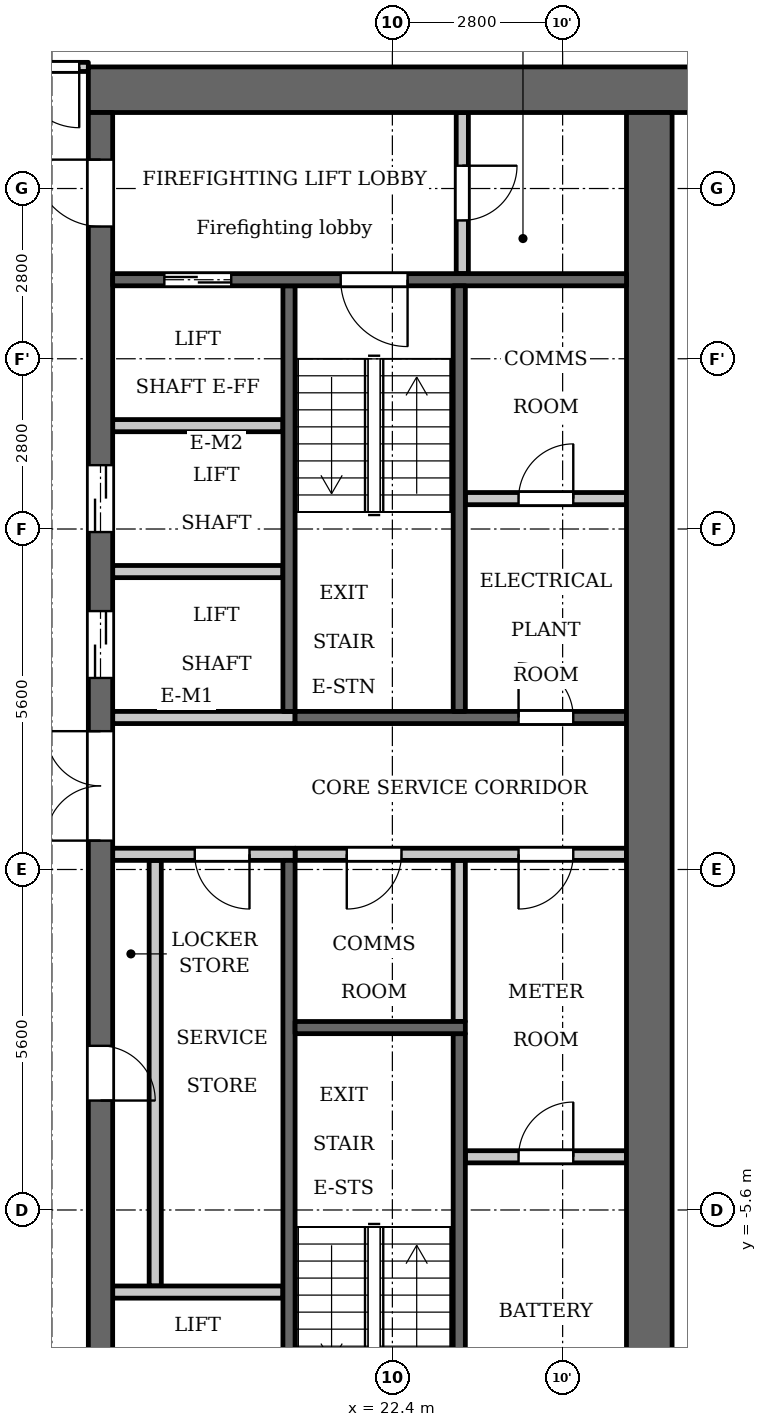
"""IFC4 building model, lengths in metres.
Left out: names, types, materials, properties, quantities, classifications, styles, units other than length and angle.
Written with IfcOpenShell. Run it as: python <this file> out.ifc"""

import sys

from ifc_helpers import new_model, si_unit, direction, frame, frame_2d, origin, place, context, subcontext, project, spatial, rectangle, extrude, element, fill, save


model = new_model("IFC4")
c1 = context("Model", 3, precision=1e-05, world=origin(), true_north=direction((0.0, 1.0)))
c2 = subcontext(c1, "Body", "Model", "MODEL_VIEW")
j1 = project(units=[si_unit("LENGTHUNIT", "METRE"), si_unit("PLANEANGLEUNIT", "RADIAN")], contexts=[c1])
p1 = place(None, origin())
s1 = spatial("IfcSite", under=j1, at=p1, CompositionType="ELEMENT")
p2 = place(p1, origin())
s2 = spatial("IfcBuilding", under=s1, at=p2, CompositionType="ELEMENT")
p3 = place(p2, frame((0.0, 0.0, 157.1)))
s3 = spatial("IfcBuildingStorey", under=s2, at=p3, CompositionType="ELEMENT", Elevation=157.1)
p4 = place(p3, frame((23.5, -2.5, 0.0), z_axis=(0.0, 0.0, 1.0), x_axis=(0.0, 1.0, 0.0)))
e1 = element("IfcWall", 1, at=p4, inside=s3, PredefinedType="PARTITIONING", context=c2, shape_type="SweptSolid", body=[
    extrude(rectangle(XDim=2.65, YDim=0.2, at=frame_2d((1.325, 0.0))), origin(), (0.0, 0.0, 1.0), 3.2),
])
p5 = place(p3, frame((20.7, 2.6, 0.0), z_axis=(0.0, 0.0, 1.0), x_axis=(0.0, 1.0, 0.0)))
e2 = element("IfcWall", 2, at=p5, inside=s3, PredefinedType="SHEAR", context=c2, shape_type="SweptSolid", body=[
    extrude(rectangle(XDim=7.0, YDim=0.2, at=frame_2d((3.5, 0.0))), origin(), (0.0, 0.0, 1.0), 3.2),
])
p6 = place(p3, frame((20.7, -9.6, 0.0), z_axis=(0.0, 0.0, 1.0), x_axis=(0.0, 1.0, 0.0)))
e3 = element("IfcWall", 3, at=p6, inside=s3, PredefinedType="SHEAR", context=c2, shape_type="SweptSolid", body=[
    extrude(rectangle(XDim=9.75, YDim=0.2, at=frame_2d((4.875, 0.0))), origin(), (0.0, 0.0, 1.0), 3.2),
])
p7 = place(p3, frame((20.8, 2.5, 0.0), z_axis=(0.0, 0.0, 1.0), x_axis=(1.0, 0.0, 0.0)))
e4 = element("IfcWall", 4, at=p7, inside=s3, PredefinedType="SHEAR", context=c2, shape_type="SweptSolid", body=[
    extrude(rectangle(XDim=5.45, YDim=0.2, at=frame_2d((2.725, 0.0))), origin(), (0.0, 0.0, 1.0), 3.2),
])
p8 = place(p7, frame((3.675, 0.0, 0.0)))
e5 = element("IfcOpeningElement", 5, at=p8, cuts=e4, PredefinedType="OPENING", context=c2, shape_type="SweptSolid", body=[
    extrude(rectangle(XDim=0.9, YDim=2.1, at=frame_2d((0.45, 1.05))), frame((0.0, 0.11, 0.0), z_axis=(0.0, -1.0, 0.0), x_axis=(1.0, 0.0, 0.0)), (0.0, 0.0, 1.0), 0.22),
])
p9 = place(p3, frame((20.8, 0.25, 0.0), z_axis=(0.0, 0.0, 1.0), x_axis=(1.0, 0.0, 0.0)))
e6 = element("IfcWall", 6, at=p9, inside=s3, PredefinedType="PARTITIONING", context=c2, shape_type="SweptSolid", body=[
    extrude(rectangle(XDim=5.45, YDim=0.2, at=frame_2d((2.725, 0.0))), origin(), (0.0, 0.0, 1.0), 3.2),
])
p10 = place(p9, frame((0.85, 0.0, 0.0)))
e7 = element("IfcOpeningElement", 7, at=p10, cuts=e6, PredefinedType="OPENING", context=c2, shape_type="SweptSolid", body=[
    extrude(rectangle(XDim=0.9, YDim=2.1, at=frame_2d((0.45, 1.05))), frame((0.0, 0.11, 0.0), z_axis=(0.0, -1.0, 0.0), x_axis=(1.0, 0.0, 0.0)), (0.0, 0.0, 1.0), 0.22),
])
p11 = place(p9, frame((3.675, 0.0, 0.0)))
e8 = element("IfcOpeningElement", 8, at=p11, cuts=e6, PredefinedType="OPENING", context=c2, shape_type="SweptSolid", body=[
    extrude(rectangle(XDim=0.9, YDim=2.1, at=frame_2d((0.45, 1.05))), frame((0.0, 0.11, 0.0), z_axis=(0.0, -1.0, 0.0), x_axis=(1.0, 0.0, 0.0)), (0.0, 0.0, 1.0), 0.22),
])
p12 = place(p3, frame((17.4, 12.825, 0.0), z_axis=(0.0, 0.0, 1.0), x_axis=(1.0, 0.0, 0.0)))
e9 = element("IfcWall", 9, at=p12, inside=s3, PredefinedType="SHEAR", context=c2, shape_type="SweptSolid", body=[
    extrude(rectangle(XDim=10.4, YDim=0.75, at=frame_2d((5.2, 0.0))), origin(), (0.0, 0.0, 1.0), 3.2),
])
p13 = place(p3, frame((18.5, -6.85, 0.0), z_axis=(0.0, 0.0, 1.0), x_axis=(0.0, 1.0, 0.0)))
e10 = element("IfcWall", 10, at=p13, inside=s3, PredefinedType="PARTITIONING", context=c2, shape_type="SweptSolid", body=[
    extrude(rectangle(XDim=7.0, YDim=0.2, at=frame_2d((3.5, 0.0))), origin(), (0.0, 0.0, 1.0), 3.2),
])
p14 = place(p3, frame((17.6, -12.45, 0.0), z_axis=(0.0, 0.0, 1.0), x_axis=(0.0, 1.0, 0.0)))
e11 = element("IfcWall", 11, at=p14, inside=s3, PredefinedType="SHEAR", context=c2, shape_type="SweptSolid", body=[
    extrude(rectangle(XDim=24.9, YDim=0.4, at=frame_2d((12.45, 0.0))), origin(), (0.0, 0.0, 1.0), 3.2),
])
p15 = place(p14, frame((8.65, 0.0, 0.0)))
e12 = element("IfcOpeningElement", 12, at=p15, cuts=e11, PredefinedType="OPENING", context=c2, shape_type="SweptSolid", body=[
    extrude(rectangle(XDim=0.9, YDim=2.1, at=frame_2d((0.45, 1.05))), frame((0.0, 0.21, 0.0), z_axis=(0.0, -1.0, 0.0), x_axis=(1.0, 0.0, 0.0)), (0.0, 0.0, 1.0), 0.42),
])
p16 = place(p14, frame((15.6, 0.0, 0.0)))
e13 = element("IfcOpeningElement", 13, at=p16, cuts=e11, PredefinedType="OPENING", context=c2, shape_type="SweptSolid", body=[
    extrude(rectangle(XDim=1.1, YDim=2.1, at=frame_2d((0.55, 1.05))), frame((0.0, 0.21, 0.0), z_axis=(0.0, -1.0, 0.0), x_axis=(1.0, 0.0, 0.0)), (0.0, 0.0, 1.0), 0.42),
])
p17 = place(p14, frame((18.0, 0.0, 0.0)))
e14 = element("IfcOpeningElement", 14, at=p17, cuts=e11, PredefinedType="OPENING", context=c2, shape_type="SweptSolid", body=[
    extrude(rectangle(XDim=1.1, YDim=2.1, at=frame_2d((0.55, 1.05))), frame((0.0, 0.21, 0.0), z_axis=(0.0, -1.0, 0.0), x_axis=(1.0, 0.0, 0.0)), (0.0, 0.0, 1.0), 0.42),
])
p18 = place(p14, frame((23.025, 0.0, 0.0)))
e15 = element("IfcOpeningElement", 15, at=p18, cuts=e11, PredefinedType="OPENING", context=c2, shape_type="SweptSolid", body=[
    extrude(rectangle(XDim=1.1, YDim=2.1, at=frame_2d((0.55, 1.05))), frame((0.0, 0.21, 0.0), z_axis=(0.0, -1.0, 0.0), x_axis=(1.0, 0.0, 0.0)), (0.0, 0.0, 1.0), 0.42),
])
p19 = place(p14, frame((0.775, 0.0, 0.0)))
e16 = element("IfcOpeningElement", 16, at=p19, cuts=e11, PredefinedType="OPENING", context=c2, shape_type="SweptSolid", body=[
    extrude(rectangle(XDim=1.1, YDim=2.1, at=frame_2d((0.55, 1.05))), frame((0.0, 0.21, 0.0), z_axis=(0.0, -1.0, 0.0), x_axis=(1.0, 0.0, 0.0)), (0.0, 0.0, 1.0), 0.42),
])
p20 = place(p14, frame((12.925, 0.0, 0.0)))
e17 = element("IfcOpeningElement", 17, at=p20, cuts=e11, PredefinedType="OPENING", context=c2, shape_type="SweptSolid", body=[
    extrude(rectangle(XDim=1.8, YDim=2.1, at=frame_2d((0.9, 1.05))), frame((0.0, 0.21, 0.0), z_axis=(0.0, -1.0, 0.0), x_axis=(1.0, 0.0, 0.0)), (0.0, 0.0, 1.0), 0.42),
])
p21 = place(p3, frame((26.625, -12.45, 0.0), z_axis=(0.0, 0.0, 1.0), x_axis=(0.0, 1.0, 0.0)))
e18 = element("IfcWall", 18, at=p21, inside=s3, PredefinedType="SHEAR", context=c2, shape_type="SweptSolid", body=[
    extrude(rectangle(XDim=24.9, YDim=0.75, at=frame_2d((12.45, 0.0))), origin(), (0.0, 0.0, 1.0), 3.2),
])
p22 = place(p3, frame((23.55, 9.8, 0.0), z_axis=(0.0, 0.0, 1.0), x_axis=(0.0, 1.0, 0.0)))
e19 = element("IfcWall", 19, at=p22, inside=s3, PredefinedType="PARTITIONING", context=c2, shape_type="SweptSolid", body=[
    extrude(rectangle(XDim=2.65, YDim=0.2, at=frame_2d((1.325, 0.0))), origin(), (0.0, 0.0, 1.0), 3.2),
])
p23 = place(p22, frame((0.875, 0.0, 0.0)))
e20 = element("IfcOpeningElement", 20, at=p23, cuts=e19, PredefinedType="OPENING", context=c2, shape_type="SweptSolid", body=[
    extrude(rectangle(XDim=0.9, YDim=2.1, at=frame_2d((0.45, 1.05))), frame((0.0, 0.11, 0.0), z_axis=(0.0, -1.0, 0.0), x_axis=(1.0, 0.0, 0.0)), (0.0, 0.0, 1.0), 0.22),
])
p24 = place(p3, frame((23.6, -4.725, 0.0), z_axis=(0.0, 0.0, 1.0), x_axis=(1.0, 0.0, 0.0)))
e21 = element("IfcWall", 21, at=p24, inside=s3, PredefinedType="PARTITIONING", context=c2, shape_type="SweptSolid", body=[
    extrude(rectangle(XDim=2.65, YDim=0.2, at=frame_2d((1.325, 0.0))), origin(), (0.0, 0.0, 1.0), 3.2),
])
p25 = place(p24, frame((0.875, 0.0, 0.0)))
e22 = element("IfcOpeningElement", 22, at=p25, cuts=e21, PredefinedType="OPENING", context=c2, shape_type="SweptSolid", body=[
    extrude(rectangle(XDim=0.9, YDim=2.1, at=frame_2d((0.45, 1.05))), frame((0.0, 0.11, 0.0), z_axis=(0.0, -1.0, 0.0), x_axis=(1.0, 0.0, 0.0)), (0.0, 0.0, 1.0), 0.22),
])
p26 = place(p3, frame((23.6, 6.1, 0.0), z_axis=(0.0, 0.0, 1.0), x_axis=(1.0, 0.0, 0.0)))
e23 = element("IfcWall", 23, at=p26, inside=s3, PredefinedType="PARTITIONING", context=c2, shape_type="SweptSolid", body=[
    extrude(rectangle(XDim=2.65, YDim=0.2, at=frame_2d((1.325, 0.0))), origin(), (0.0, 0.0, 1.0), 3.2),
])
p27 = place(p26, frame((0.875, 0.0, 0.0)))
e24 = element("IfcOpeningElement", 24, at=p27, cuts=e23, PredefinedType="OPENING", context=c2, shape_type="SweptSolid", body=[
    extrude(rectangle(XDim=0.9, YDim=2.1, at=frame_2d((0.45, 1.05))), frame((0.0, 0.11, 0.0), z_axis=(0.0, -1.0, 0.0), x_axis=(1.0, 0.0, 0.0)), (0.0, 0.0, 1.0), 0.22),
])
p28 = place(p3, frame((17.8, -6.95, 0.0), z_axis=(0.0, 0.0, 1.0), x_axis=(1.0, 0.0, 0.0)))
e25 = element("IfcWall", 25, at=p28, inside=s3, PredefinedType="PARTITIONING", context=c2, shape_type="SweptSolid", body=[
    extrude(rectangle(XDim=2.8, YDim=0.2, at=frame_2d((1.4, 0.0))), origin(), (0.0, 0.0, 1.0), 3.2),
])
p29 = place(p3, frame((17.8, 0.25, 0.0), z_axis=(0.0, 0.0, 1.0), x_axis=(1.0, 0.0, 0.0)))
e26 = element("IfcWall", 26, at=p29, inside=s3, PredefinedType="PARTITIONING", context=c2, shape_type="SweptSolid", body=[
    extrude(rectangle(XDim=3.0, YDim=0.2, at=frame_2d((1.5, 0.0))), origin(), (0.0, 0.0, 1.0), 3.2),
])
p30 = place(p29, frame((1.35, 0.0, 0.0)))
e27 = element("IfcOpeningElement", 27, at=p30, cuts=e26, PredefinedType="OPENING", context=c2, shape_type="SweptSolid", body=[
    extrude(rectangle(XDim=0.9, YDim=2.1, at=frame_2d((0.45, 1.05))), frame((0.0, 0.11, 0.0), z_axis=(0.0, -1.0, 0.0), x_axis=(1.0, 0.0, 0.0)), (0.0, 0.0, 1.0), 0.22),
])
p31 = place(p3, frame((17.8, 2.5, 0.0), z_axis=(0.0, 0.0, 1.0), x_axis=(1.0, 0.0, 0.0)))
e28 = element("IfcWall", 28, at=p31, inside=s3, PredefinedType="PARTITIONING", context=c2, shape_type="SweptSolid", body=[
    extrude(rectangle(XDim=3.0, YDim=0.2, at=frame_2d((1.5, 0.0))), origin(), (0.0, 0.0, 1.0), 3.2),
])
for number, where, z_axis, x_axis in (
    (29, (17.8, 4.9, 0.0), (0.0, 0.0, 1.0), (1.0, 0.0, 0.0)),
    (30, (17.8, 7.3, 0.0), (0.0, 0.0, 1.0), (1.0, 0.0, 0.0)),
):
    element("IfcWall", number, at=place(p3, frame(where, z_axis=z_axis, x_axis=x_axis)), inside=s3, PredefinedType="PARTITIONING", context=c2, shape_type="SweptSolid", body=[
        extrude(rectangle(XDim=2.8, YDim=0.2, at=frame_2d((1.4, 0.0))), origin(), (0.0, 0.0, 1.0), 3.2),
    ])
p32 = place(p3, frame((17.8, 9.7, 0.0), z_axis=(0.0, 0.0, 1.0), x_axis=(1.0, 0.0, 0.0)))
e31 = element("IfcWall", 31, at=p32, inside=s3, PredefinedType="SHEAR", context=c2, shape_type="SweptSolid", body=[
    extrude(rectangle(XDim=8.45, YDim=0.2, at=frame_2d((4.225, 0.0))), origin(), (0.0, 0.0, 1.0), 3.2),
])
p33 = place(p32, frame((0.85, 0.0, 0.0)))
e32 = element("IfcOpeningElement", 32, at=p33, cuts=e31, PredefinedType="OPENING", context=c2, shape_type="SweptSolid", body=[
    extrude(rectangle(XDim=1.1, YDim=2.1, at=frame_2d((0.55, 1.05))), frame((0.0, 0.11, 0.0), z_axis=(0.0, -1.0, 0.0), x_axis=(1.0, 0.0, 0.0)), (0.0, 0.0, 1.0), 0.22),
])
p34 = place(p32, frame((3.75, 0.0, 0.0)))
e33 = element("IfcOpeningElement", 33, at=p34, cuts=e31, PredefinedType="OPENING", context=c2, shape_type="SweptSolid", body=[
    extrude(rectangle(XDim=1.1, YDim=2.1, at=frame_2d((0.55, 1.05))), frame((0.0, 0.11, 0.0), z_axis=(0.0, -1.0, 0.0), x_axis=(1.0, 0.0, 0.0)), (0.0, 0.0, 1.0), 0.22),
])
p35 = place(p3, frame((23.5, 2.6, 0.0), z_axis=(0.0, 0.0, 1.0), x_axis=(0.0, 1.0, 0.0)))
e34 = element("IfcWall", 34, at=p35, inside=s3, PredefinedType="SHEAR", context=c2, shape_type="SweptSolid", body=[
    extrude(rectangle(XDim=7.0, YDim=0.2, at=frame_2d((3.5, 0.0))), origin(), (0.0, 0.0, 1.0), 3.2),
])
p36 = place(p3, frame((23.5, -9.6, 0.0), z_axis=(0.0, 0.0, 1.0), x_axis=(0.0, 1.0, 0.0)))
e35 = element("IfcWall", 35, at=p36, inside=s3, PredefinedType="SHEAR", context=c2, shape_type="SweptSolid", body=[
    extrude(rectangle(XDim=6.9, YDim=0.2, at=frame_2d((3.45, 0.0))), origin(), (0.0, 0.0, 1.0), 3.2),
])
p37 = place(p3, frame((20.8, -2.6, 0.0), z_axis=(0.0, 0.0, 1.0), x_axis=(1.0, 0.0, 0.0)))
e36 = element("IfcWall", 36, at=p37, inside=s3, PredefinedType="SHEAR", context=c2, shape_type="SweptSolid", body=[
    extrude(rectangle(XDim=2.8, YDim=0.2, at=frame_2d((1.4, 0.0))), origin(), (0.0, 0.0, 1.0), 3.2),
])
p38 = place(p3, frame((-17.4, 13.2, 0.0), z_axis=(0.0, 0.0, 1.0), x_axis=(1.0, 0.0, 0.0)))
e37 = element("IfcWall", 37, at=p38, inside=s3, PredefinedType="PARTITIONING", context=c2, shape_type="SweptSolid", body=[
    extrude(rectangle(XDim=34.8, YDim=0.15, at=frame_2d((17.4, 0.0))), origin(), (0.0, 0.0, 1.0), 3.2),
])
p39 = place(p38, frame((0.25, 0.0, 0.0)))
e38 = element("IfcOpeningElement", 38, at=p39, cuts=e37, PredefinedType="OPENING", context=c2, shape_type="SweptSolid", body=[
    extrude(rectangle(XDim=1.0, YDim=2.1, at=frame_2d((0.5, 1.05))), frame((0.0, 0.085, 0.0), z_axis=(0.0, -1.0, 0.0), x_axis=(1.0, 0.0, 0.0)), (0.0, 0.0, 1.0), 0.17),
])
p40 = place(p38, frame((33.65, 0.0, 0.0)))
e39 = element("IfcOpeningElement", 39, at=p40, cuts=e37, PredefinedType="OPENING", context=c2, shape_type="SweptSolid", body=[
    extrude(rectangle(XDim=1.0, YDim=2.1, at=frame_2d((0.5, 1.05))), frame((0.0, 0.085, 0.0), z_axis=(0.0, -1.0, 0.0), x_axis=(1.0, 0.0, 0.0)), (0.0, 0.0, 1.0), 0.17),
])
p41 = place(p38, frame((15.75, 0.0, 0.0)))
e40 = element("IfcOpeningElement", 40, at=p41, cuts=e37, PredefinedType="OPENING", context=c2, shape_type="SweptSolid", body=[
    extrude(rectangle(XDim=1.0, YDim=2.1, at=frame_2d((0.5, 1.05))), frame((0.0, 0.085, 0.0), z_axis=(0.0, -1.0, 0.0), x_axis=(1.0, 0.0, 0.0)), (0.0, 0.0, 1.0), 0.17),
])
p42 = place(p38, frame((20.85, 0.0, 0.0)))
e41 = element("IfcOpeningElement", 41, at=p42, cuts=e37, PredefinedType="OPENING", context=c2, shape_type="SweptSolid", body=[
    extrude(rectangle(XDim=1.0, YDim=2.1, at=frame_2d((0.5, 1.05))), frame((0.0, 0.085, 0.0), z_axis=(0.0, -1.0, 0.0), x_axis=(1.0, 0.0, 0.0)), (0.0, 0.0, 1.0), 0.17),
])
p43 = place(p38, frame((23.55, 0.0, 0.0)))
e42 = element("IfcOpeningElement", 42, at=p43, cuts=e37, PredefinedType="OPENING", context=c2, shape_type="SweptSolid", body=[
    extrude(rectangle(XDim=1.0, YDim=2.1, at=frame_2d((0.5, 1.05))), frame((0.0, 0.085, 0.0), z_axis=(0.0, -1.0, 0.0), x_axis=(1.0, 0.0, 0.0)), (0.0, 0.0, 1.0), 0.17),
])
p44 = place(p15, origin())
e43 = element("IfcDoor", 43, at=p44, inside=s3, OperationType="SINGLE_SWING_LEFT", PredefinedType="DOOR", context=c2, shape_type="SweptSolid", body=[
    extrude(rectangle(XDim=0.9, YDim=2.1, at=frame_2d((0.45, 1.05))), frame((0.0, 0.025, 0.0), z_axis=(0.0, -1.0, 0.0), x_axis=(1.0, 0.0, 0.0)), (0.0, 0.0, 1.0), 0.05),
])
fill(e12, e43)
p45 = place(p30, origin())
e44 = element("IfcDoor", 44, at=p45, inside=s3, OperationType="SINGLE_SWING_RIGHT", PredefinedType="DOOR", context=c2, shape_type="SweptSolid", body=[
    extrude(rectangle(XDim=0.9, YDim=2.1, at=frame_2d((0.45, 1.05))), frame((0.0, 0.025, 0.0), z_axis=(0.0, -1.0, 0.0), x_axis=(1.0, 0.0, 0.0)), (0.0, 0.0, 1.0), 0.05),
])
fill(e27, e44)
p46 = place(p16, origin())
e45 = element("IfcDoor", 45, at=p46, inside=s3, OperationType="DOUBLE_DOOR_SLIDING", PredefinedType="DOOR", context=c2, shape_type="SweptSolid", body=[
    extrude(rectangle(XDim=1.1, YDim=2.1, at=frame_2d((0.55, 1.05))), frame((0.0, 0.025, 0.0), z_axis=(0.0, -1.0, 0.0), x_axis=(1.0, 0.0, 0.0)), (0.0, 0.0, 1.0), 0.05),
])
fill(e13, e45)
p47 = place(p17, origin())
e46 = element("IfcDoor", 46, at=p47, inside=s3, OperationType="DOUBLE_DOOR_SLIDING", PredefinedType="DOOR", context=c2, shape_type="SweptSolid", body=[
    extrude(rectangle(XDim=1.1, YDim=2.1, at=frame_2d((0.55, 1.05))), frame((0.0, 0.025, 0.0), z_axis=(0.0, -1.0, 0.0), x_axis=(1.0, 0.0, 0.0)), (0.0, 0.0, 1.0), 0.05),
])
fill(e14, e46)
p48 = place(p33, origin())
e47 = element("IfcDoor", 47, at=p48, inside=s3, OperationType="DOUBLE_DOOR_SLIDING", PredefinedType="DOOR", context=c2, shape_type="SweptSolid", body=[
    extrude(rectangle(XDim=1.1, YDim=2.1, at=frame_2d((0.55, 1.05))), frame((0.0, 0.025, 0.0), z_axis=(0.0, -1.0, 0.0), x_axis=(1.0, 0.0, 0.0)), (0.0, 0.0, 1.0), 0.05),
])
fill(e32, e47)
p49 = place(p18, origin())
e48 = element("IfcDoor", 48, at=p49, inside=s3, OperationType="SINGLE_SWING_LEFT", PredefinedType="DOOR", context=c2, shape_type="SweptSolid", body=[
    extrude(rectangle(XDim=1.1, YDim=2.1, at=frame_2d((0.55, 1.05))), frame((0.0, 0.025, 0.0), z_axis=(0.0, -1.0, 0.0), x_axis=(1.0, 0.0, 0.0)), (0.0, 0.0, 1.0), 0.05),
])
fill(e15, e48)
p50 = place(p23, origin())
e49 = element("IfcDoor", 49, at=p50, inside=s3, OperationType="SINGLE_SWING_RIGHT", PredefinedType="DOOR", context=c2, shape_type="SweptSolid", body=[
    extrude(rectangle(XDim=0.9, YDim=2.1, at=frame_2d((0.45, 1.05))), frame((0.0, 0.025, 0.0), z_axis=(0.0, -1.0, 0.0), x_axis=(1.0, 0.0, 0.0)), (0.0, 0.0, 1.0), 0.05),
])
fill(e20, e49)
p51 = place(p34, origin())
e50 = element("IfcDoor", 50, at=p51, inside=s3, OperationType="SINGLE_SWING_RIGHT", PredefinedType="DOOR", context=c2, shape_type="SweptSolid", body=[
    extrude(rectangle(XDim=1.1, YDim=2.1, at=frame_2d((0.55, 1.05))), frame((0.0, 0.025, 0.0), z_axis=(0.0, -1.0, 0.0), x_axis=(1.0, 0.0, 0.0)), (0.0, 0.0, 1.0), 0.05),
])
fill(e33, e50)
p52 = place(p20, origin())
e51 = element("IfcDoor", 51, at=p52, inside=s3, OperationType="DOUBLE_DOOR_SINGLE_SWING", PredefinedType="DOOR", context=c2, shape_type="SweptSolid", body=[
    extrude(rectangle(XDim=1.8, YDim=2.1, at=frame_2d((0.9, 1.05))), frame((0.0, 0.025, 0.0), z_axis=(0.0, -1.0, 0.0), x_axis=(1.0, 0.0, 0.0)), (0.0, 0.0, 1.0), 0.05),
])
fill(e17, e51)
p53 = place(p10, origin())
e52 = element("IfcDoor", 52, at=p53, inside=s3, OperationType="SINGLE_SWING_LEFT", PredefinedType="DOOR", context=c2, shape_type="SweptSolid", body=[
    extrude(rectangle(XDim=0.9, YDim=2.1, at=frame_2d((0.45, 1.05))), frame((0.0, 0.025, 0.0), z_axis=(0.0, -1.0, 0.0), x_axis=(1.0, 0.0, 0.0)), (0.0, 0.0, 1.0), 0.05),
])
fill(e7, e52)
p54 = place(p25, origin())
e53 = element("IfcDoor", 53, at=p54, inside=s3, OperationType="SINGLE_SWING_LEFT", PredefinedType="DOOR", context=c2, shape_type="SweptSolid", body=[
    extrude(rectangle(XDim=0.9, YDim=2.1, at=frame_2d((0.45, 1.05))), frame((0.0, 0.025, 0.0), z_axis=(0.0, -1.0, 0.0), x_axis=(1.0, 0.0, 0.0)), (0.0, 0.0, 1.0), 0.05),
])
fill(e22, e53)
p55 = place(p11, origin())
e54 = element("IfcDoor", 54, at=p55, inside=s3, OperationType="SINGLE_SWING_LEFT", PredefinedType="DOOR", context=c2, shape_type="SweptSolid", body=[
    extrude(rectangle(XDim=0.9, YDim=2.1, at=frame_2d((0.45, 1.05))), frame((0.0, 0.025, 0.0), z_axis=(0.0, -1.0, 0.0), x_axis=(1.0, 0.0, 0.0)), (0.0, 0.0, 1.0), 0.05),
])
fill(e8, e54)
p56 = place(p27, origin())
e55 = element("IfcDoor", 55, at=p56, inside=s3, OperationType="SINGLE_SWING_LEFT", PredefinedType="DOOR", context=c2, shape_type="SweptSolid", body=[
    extrude(rectangle(XDim=0.9, YDim=2.1, at=frame_2d((0.45, 1.05))), frame((0.0, 0.025, 0.0), z_axis=(0.0, -1.0, 0.0), x_axis=(1.0, 0.0, 0.0)), (0.0, 0.0, 1.0), 0.05),
])
fill(e24, e55)
p57 = place(p8, origin())
e56 = element("IfcDoor", 56, at=p57, inside=s3, OperationType="SINGLE_SWING_RIGHT", PredefinedType="DOOR", context=c2, shape_type="SweptSolid", body=[
    extrude(rectangle(XDim=0.9, YDim=2.1, at=frame_2d((0.45, 1.05))), frame((0.0, 0.025, 0.0), z_axis=(0.0, -1.0, 0.0), x_axis=(1.0, 0.0, 0.0)), (0.0, 0.0, 1.0), 0.05),
])
fill(e5, e56)
p58 = place(p40, origin())
e57 = element("IfcDoor", 57, at=p58, inside=s3, OperationType="SINGLE_SWING_RIGHT", PredefinedType="DOOR", context=c2, shape_type="SweptSolid", body=[
    extrude(rectangle(XDim=1.0, YDim=2.1, at=frame_2d((0.5, 1.05))), frame((0.0, 0.025, 0.0), z_axis=(0.0, -1.0, 0.0), x_axis=(1.0, 0.0, 0.0)), (0.0, 0.0, 1.0), 0.05),
])
fill(e39, e57)
save(model, sys.argv[1])
